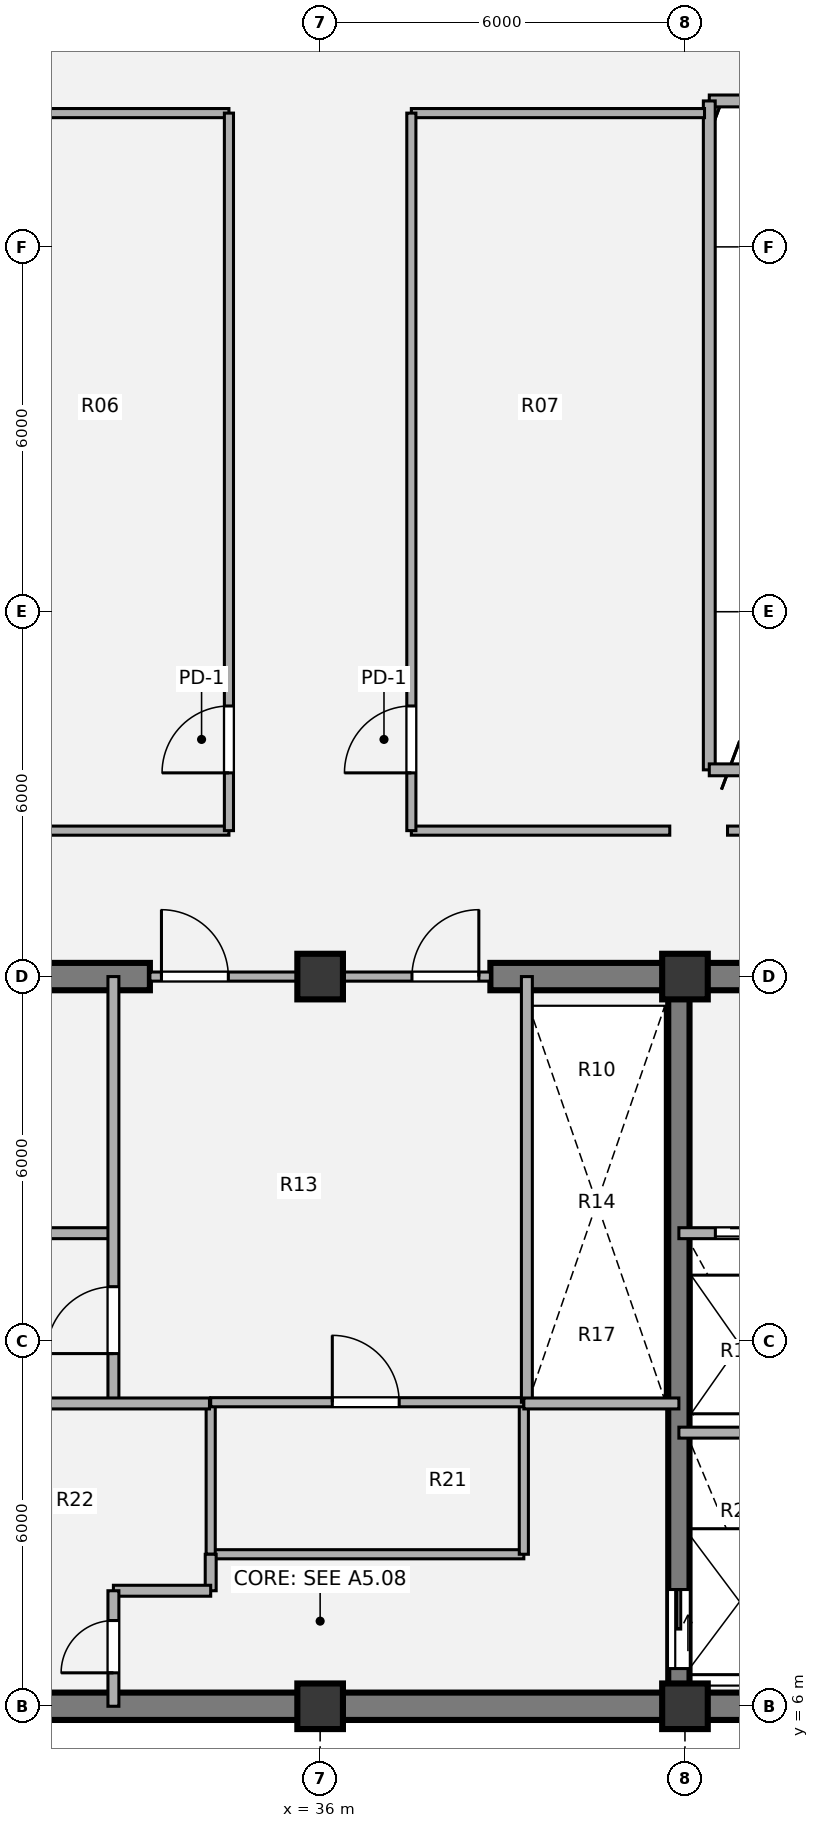
"""IFC4 building model, lengths in metres.
Left out: names, types, materials, properties, quantities, classifications, styles, units other than length and angle.
Written with IfcOpenShell. Run it as: python <this file> out.ifc"""

import sys

from ifc_helpers import new_model, si_unit, direction, frame, frame_2d, origin, origin_2d, place, context, subcontext, project, spatial, rectangle, extrude, source, transform, mapped, element, fill, save


model = new_model("IFC4")
c1 = context("Model", 3, precision=1e-05, world=origin(), true_north=direction((0.0, 1.0)))
c2 = subcontext(c1, "Body", "Model", "MODEL_VIEW")
j1 = project(units=[si_unit("LENGTHUNIT", "METRE"), si_unit("PLANEANGLEUNIT", "RADIAN")], contexts=[c1])
p1 = place(None, origin())
s1 = spatial("IfcSite", under=j1, at=p1, CompositionType="ELEMENT")
p2 = place(p1, origin())
s2 = spatial("IfcBuilding", under=s1, at=p2, CompositionType="ELEMENT")
p3 = place(p2, frame((0.0, 0.0, 213.12)))
s3 = spatial("IfcBuildingStorey", under=s2, at=p3, CompositionType="ELEMENT", Elevation=213.12)
m1 = source(origin(), c2, "Body", "SweptSolid", [
    extrude(rectangle(XDim=0.75, YDim=0.75, at=origin_2d()), origin(), (0.0, 0.0, 1.0), 5.4),
])
for number, where, z_axis, x_axis in (
    (1, (36.0, 6.0, 0.0), (0.0, 0.0, 1.0), (1.0, 0.0, 0.0)),
    (2, (42.0, 6.0, 0.0), (0.0, 0.0, 1.0), (1.0, 0.0, 0.0)),
    (3, (36.0, 18.0, 0.0), (0.0, 0.0, 1.0), (1.0, 0.0, 0.0)),
    (4, (42.0, 18.0, 0.0), (0.0, 0.0, 1.0), (1.0, 0.0, 0.0)),
):
    element("IfcColumn", number, at=place(p3, frame(where, z_axis=z_axis, x_axis=x_axis)), inside=s3, PredefinedType="COLUMN", context=c2, shape_type="MappedRepresentation", body=[
        mapped(m1, transform((0.0, 0.0, 0.0), x_axis=(1.0, 0.0, 0.0), y_axis=(0.0, 1.0, 0.0), z_axis=(0.0, 0.0, 1.0), scale=1.0)),
    ])
p4 = place(p3, frame((48.225, 6.0, 0.0), z_axis=(0.0, 0.0, 1.0), x_axis=(-1.0, 0.0, 0.0)))
e5 = element("IfcWall", 5, at=p4, inside=s3, PredefinedType="SHEAR", context=c2, shape_type="SweptSolid", body=[
    extrude(rectangle(XDim=24.45, YDim=0.45, at=frame_2d((12.225, 0.0))), origin(), (0.0, 0.0, 1.0), 5.4),
])
p5 = place(p3, frame((23.775, 18.0, 0.0), z_axis=(0.0, 0.0, 1.0), x_axis=(1.0, 0.0, 0.0)))
e6 = element("IfcWall", 6, at=p5, inside=s3, PredefinedType="SHEAR", context=c2, shape_type="SweptSolid", body=[
    extrude(rectangle(XDim=9.425, YDim=0.45, at=frame_2d((4.712, 0.0))), origin(), (0.0, 0.0, 1.0), 5.4),
])
p6 = place(p5, frame((1.475, 0.0, 0.0)))
e7 = element("IfcOpeningElement", 7, at=p6, cuts=e6, PredefinedType="OPENING", context=c2, shape_type="SweptSolid", body=[
    extrude(rectangle(XDim=1.1, YDim=2.1, at=origin_2d()), frame((0.55, 0.235, 1.05), z_axis=(0.0, -1.0, 0.0), x_axis=(1.0, 0.0, 0.0)), (0.0, 0.0, 1.0), 0.47),
])
p7 = place(p5, frame((3.475, 0.0, 0.0)))
e8 = element("IfcOpeningElement", 8, at=p7, cuts=e6, PredefinedType="OPENING", context=c2, shape_type="SweptSolid", body=[
    extrude(rectangle(XDim=1.1, YDim=2.1, at=origin_2d()), frame((0.55, 0.235, 1.05), z_axis=(0.0, -1.0, 0.0), x_axis=(1.0, 0.0, 0.0)), (0.0, 0.0, 1.0), 0.47),
])
p8 = place(p3, frame((38.8, 18.0, 0.0), z_axis=(0.0, 0.0, 1.0), x_axis=(1.0, 0.0, 0.0)))
e9 = element("IfcWall", 9, at=p8, inside=s3, PredefinedType="SHEAR", context=c2, shape_type="SweptSolid", body=[
    extrude(rectangle(XDim=9.425, YDim=0.45, at=frame_2d((4.712, 0.0))), origin(), (0.0, 0.0, 1.0), 5.4),
])
p9 = place(p8, frame((4.85, 0.0, 0.0)))
e10 = element("IfcOpeningElement", 10, at=p9, cuts=e9, PredefinedType="OPENING", context=c2, shape_type="SweptSolid", body=[
    extrude(rectangle(XDim=1.1, YDim=2.1, at=origin_2d()), frame((0.55, 0.235, 1.05), z_axis=(0.0, -1.0, 0.0), x_axis=(1.0, 0.0, 0.0)), (0.0, 0.0, 1.0), 0.47),
])
p10 = place(p8, frame((6.85, 0.0, 0.0)))
e11 = element("IfcOpeningElement", 11, at=p10, cuts=e9, PredefinedType="OPENING", context=c2, shape_type="SweptSolid", body=[
    extrude(rectangle(XDim=1.1, YDim=2.1, at=origin_2d()), frame((0.55, 0.235, 1.05), z_axis=(0.0, -1.0, 0.0), x_axis=(1.0, 0.0, 0.0)), (0.0, 0.0, 1.0), 0.47),
])
p11 = place(p3, frame((41.9, 18.0, 0.0), z_axis=(0.0, 0.0, 1.0), x_axis=(0.0, -1.0, 0.0)))
e12 = element("IfcWall", 12, at=p11, inside=s3, PredefinedType="SHEAR", context=c2, shape_type="SweptSolid", body=[
    extrude(rectangle(XDim=12.0, YDim=0.35, at=frame_2d((6.0, 0.0))), origin(), (0.0, 0.0, 1.0), 5.4),
])
p12 = place(p11, frame((10.08, 0.0, 0.0)))
e13 = element("IfcOpeningElement", 13, at=p12, cuts=e12, PredefinedType="OPENING", context=c2, shape_type="SweptSolid", body=[
    extrude(rectangle(XDim=1.3, YDim=2.1, at=origin_2d()), frame((0.65, 0.185, 1.05), z_axis=(0.0, -1.0, 0.0), x_axis=(1.0, 0.0, 0.0)), (0.0, 0.0, 1.0), 0.37),
])
p13 = place(p3, frame((53.0, 32.4, 0.0), z_axis=(0.0, 0.0, 1.0), x_axis=(-1.0, 0.0, 0.0)))
e14 = element("IfcWall", 14, at=p13, inside=s3, PredefinedType="SOLIDWALL", context=c2, shape_type="SweptSolid", body=[
    extrude(rectangle(XDim=10.6, YDim=0.195, at=frame_2d((5.3, 0.0))), origin(), (0.0, 0.0, 1.0), 5.08),
])
p14 = place(p3, frame((42.4, 32.4, 0.0), z_axis=(0.0, 0.0, 1.0), x_axis=(0.0, -1.0, 0.0)))
e15 = element("IfcWall", 15, at=p14, inside=s3, PredefinedType="SOLIDWALL", context=c2, shape_type="SweptSolid", body=[
    extrude(rectangle(XDim=11.0, YDim=0.195, at=frame_2d((5.5, 0.0))), origin(), (0.0, 0.0, 1.0), 5.08),
])
p15 = place(p3, frame((42.4, 21.4, 0.0), z_axis=(0.0, 0.0, 1.0), x_axis=(1.0, 0.0, 0.0)))
e16 = element("IfcWall", 16, at=p15, inside=s3, PredefinedType="SOLIDWALL", context=c2, shape_type="SweptSolid", body=[
    extrude(rectangle(XDim=5.25, YDim=0.195, at=frame_2d((2.625, 0.0))), origin(), (0.0, 0.0, 1.0), 5.08),
])
p16 = place(p3, frame((30.0, 13.78, 0.0), z_axis=(0.0, 0.0, 1.0), x_axis=(1.0, 0.0, 0.0)))
e17 = element("IfcWall", 17, at=p16, inside=s3, PredefinedType="PARTITIONING", context=c2, shape_type="SweptSolid", body=[
    extrude(rectangle(XDim=2.6, YDim=0.18, at=frame_2d((1.3, 0.0))), origin(), (0.0, 0.0, 1.0), 5.05),
])
p17 = place(p3, frame((32.6, 11.0, 0.0), z_axis=(0.0, 0.0, 1.0), x_axis=(0.0, 1.0, 0.0)))
e18 = element("IfcWall", 18, at=p17, inside=s3, PredefinedType="PARTITIONING", context=c2, shape_type="SweptSolid", body=[
    extrude(rectangle(XDim=7.0, YDim=0.18, at=frame_2d((3.5, 0.0))), origin(), (0.0, 0.0, 1.0), 5.05),
])
p18 = place(p17, frame((0.8, 0.0, 0.0)))
e19 = element("IfcOpeningElement", 19, at=p18, cuts=e18, PredefinedType="OPENING", context=c2, shape_type="SweptSolid", body=[
    extrude(rectangle(XDim=1.1, YDim=2.1, at=origin_2d()), frame((0.55, 0.1, 1.05), z_axis=(0.0, -1.0, 0.0), x_axis=(1.0, 0.0, 0.0)), (0.0, 0.0, 1.0), 0.2),
])
p19 = place(p3, frame((34.2, 8.5, 0.0), z_axis=(0.0, 0.0, 1.0), x_axis=(1.0, 0.0, 0.0)))
e20 = element("IfcWall", 20, at=p19, inside=s3, PredefinedType="PARTITIONING", context=c2, shape_type="SweptSolid", body=[
    extrude(rectangle(XDim=5.15, YDim=0.15, at=frame_2d((2.575, 0.0))), origin(), (0.0, 0.0, 1.0), 5.05),
])
for number, where, z_axis, x_axis in (
    (21, (34.2, 8.5, 0.0), (0.0, 0.0, 1.0), (0.0, 1.0, 0.0)),
    (22, (39.35, 8.5, 0.0), (0.0, 0.0, 1.0), (0.0, 1.0, 0.0)),
):
    element("IfcWall", number, at=place(p3, frame(where, z_axis=z_axis, x_axis=x_axis)), inside=s3, PredefinedType="PARTITIONING", context=c2, shape_type="SweptSolid", body=[
        extrude(rectangle(XDim=2.5, YDim=0.15, at=frame_2d((1.25, 0.0))), origin(), (0.0, 0.0, 1.0), 5.05),
    ])
p20 = place(p3, frame((34.2, 11.0, 0.0), z_axis=(0.0, 0.0, 1.0), x_axis=(1.0, 0.0, 0.0)))
e23 = element("IfcWall", 23, at=p20, inside=s3, PredefinedType="PARTITIONING", context=c2, shape_type="SweptSolid", body=[
    extrude(rectangle(XDim=5.15, YDim=0.15, at=frame_2d((2.575, 0.0))), origin(), (0.0, 0.0, 1.0), 5.05),
])
p21 = place(p20, frame((2.0, 0.0, 0.0)))
e24 = element("IfcOpeningElement", 24, at=p21, cuts=e23, PredefinedType="OPENING", context=c2, shape_type="SweptSolid", body=[
    extrude(rectangle(XDim=1.1, YDim=2.1, at=origin_2d()), frame((0.55, 0.085, 1.05), z_axis=(0.0, -1.0, 0.0), x_axis=(1.0, 0.0, 0.0)), (0.0, 0.0, 1.0), 0.17),
])
p22 = place(p3, frame((39.4, 11.0, 0.0), z_axis=(0.0, 0.0, 1.0), x_axis=(0.0, 1.0, 0.0)))
e25 = element("IfcWall", 25, at=p22, inside=s3, PredefinedType="PARTITIONING", context=c2, shape_type="SweptSolid", body=[
    extrude(rectangle(XDim=7.0, YDim=0.18, at=frame_2d((3.5, 0.0))), origin(), (0.0, 0.0, 1.0), 5.05),
])
p23 = place(p3, frame((30.1, 10.98, 0.0), z_axis=(0.0, 0.0, 1.0), x_axis=(1.0, 0.0, 0.0)))
e26 = element("IfcWall", 26, at=p23, inside=s3, PredefinedType="PARTITIONING", context=c2, shape_type="SweptSolid", body=[
    extrude(rectangle(XDim=4.08, YDim=0.18, at=frame_2d((2.04, 0.0))), origin(), (0.0, 0.0, 1.0), 5.05),
])
p24 = place(p3, frame((34.2, 7.9, 0.0), z_axis=(0.0, 0.0, 1.0), x_axis=(0.0, 1.0, 0.0)))
e27 = element("IfcWall", 27, at=p24, inside=s3, PredefinedType="PARTITIONING", context=c2, shape_type="SweptSolid", body=[
    extrude(rectangle(XDim=0.6, YDim=0.18, at=frame_2d((0.3, 0.0))), origin(), (0.0, 0.0, 1.0), 5.05),
])
p25 = place(p3, frame((32.6, 7.9, 0.0), z_axis=(0.0, 0.0, 1.0), x_axis=(1.0, 0.0, 0.0)))
e28 = element("IfcWall", 28, at=p25, inside=s3, PredefinedType="PARTITIONING", context=c2, shape_type="SweptSolid", body=[
    extrude(rectangle(XDim=1.6, YDim=0.18, at=frame_2d((0.8, 0.0))), origin(), (0.0, 0.0, 1.0), 5.05),
])
p26 = place(p3, frame((32.6, 6.0, 0.0), z_axis=(0.0, 0.0, 1.0), x_axis=(0.0, 1.0, 0.0)))
e29 = element("IfcWall", 29, at=p26, inside=s3, PredefinedType="PARTITIONING", context=c2, shape_type="SweptSolid", body=[
    extrude(rectangle(XDim=1.9, YDim=0.18, at=frame_2d((0.95, 0.0))), origin(), (0.0, 0.0, 1.0), 5.05),
])
p27 = place(p26, frame((0.55, 0.0, 0.0)))
e30 = element("IfcOpeningElement", 30, at=p27, cuts=e29, PredefinedType="OPENING", context=c2, shape_type="SweptSolid", body=[
    extrude(rectangle(XDim=0.86, YDim=2.1, at=origin_2d()), frame((0.43, 0.1, 1.05), z_axis=(0.0, -1.0, 0.0), x_axis=(1.0, 0.0, 0.0)), (0.0, 0.0, 1.0), 0.2),
])
p28 = place(p3, frame((39.35, 10.98, 0.0), z_axis=(0.0, 0.0, 1.0), x_axis=(1.0, 0.0, 0.0)))
e31 = element("IfcWall", 31, at=p28, inside=s3, PredefinedType="PARTITIONING", context=c2, shape_type="SweptSolid", body=[
    extrude(rectangle(XDim=2.55, YDim=0.18, at=frame_2d((1.275, 0.0))), origin(), (0.0, 0.0, 1.0), 5.05),
])
p29 = place(p3, frame((33.2, 18.0, 0.0), z_axis=(0.0, 0.0, 1.0), x_axis=(1.0, 0.0, 0.0)))
e32 = element("IfcWall", 32, at=p29, inside=s3, PredefinedType="PARTITIONING", context=c2, shape_type="SweptSolid", body=[
    extrude(rectangle(XDim=5.6, YDim=0.15, at=frame_2d((2.8, 0.0))), origin(), (0.0, 0.0, 1.0), 4.065),
])
p30 = place(p29, frame((0.19, 0.0, 0.0)))
e33 = element("IfcOpeningElement", 33, at=p30, cuts=e32, PredefinedType="OPENING", context=c2, shape_type="SweptSolid", body=[
    extrude(rectangle(XDim=1.1, YDim=2.1, at=origin_2d()), frame((0.55, 0.085, 1.05), z_axis=(0.0, -1.0, 0.0), x_axis=(1.0, 0.0, 0.0)), (0.0, 0.0, 1.0), 0.17),
])
p31 = place(p29, frame((4.31, 0.0, 0.0)))
e34 = element("IfcOpeningElement", 34, at=p31, cuts=e32, PredefinedType="OPENING", context=c2, shape_type="SweptSolid", body=[
    extrude(rectangle(XDim=1.1, YDim=2.1, at=origin_2d()), frame((0.55, 0.085, 1.05), z_axis=(0.0, -1.0, 0.0), x_axis=(1.0, 0.0, 0.0)), (0.0, 0.0, 1.0), 0.17),
])
p32 = place(p3, frame((41.9, 13.78, 0.0), z_axis=(0.0, 0.0, 1.0), x_axis=(1.0, 0.0, 0.0)))
e35 = element("IfcWall", 35, at=p32, inside=s3, PredefinedType="PARTITIONING", context=c2, shape_type="SweptSolid", body=[
    extrude(rectangle(XDim=6.1, YDim=0.18, at=frame_2d((3.05, 0.0))), origin(), (0.0, 0.0, 1.0), 2.229),
])
p33 = place(p32, frame((0.6, 0.0, 0.0)))
e36 = element("IfcOpeningElement", 36, at=p33, cuts=e35, PredefinedType="OPENING", context=c2, shape_type="SweptSolid", body=[
    extrude(rectangle(XDim=1.1, YDim=2.1, at=origin_2d()), frame((0.55, 0.1, 1.05), z_axis=(0.0, -1.0, 0.0), x_axis=(1.0, 0.0, 0.0)), (0.0, 0.0, 1.0), 0.2),
])
p34 = place(p32, frame((3.8, 0.0, 0.0)))
e37 = element("IfcOpeningElement", 37, at=p34, cuts=e35, PredefinedType="OPENING", context=c2, shape_type="SweptSolid", body=[
    extrude(rectangle(XDim=1.1, YDim=2.1, at=origin_2d()), frame((0.55, 0.1, 1.05), z_axis=(0.0, -1.0, 0.0), x_axis=(1.0, 0.0, 0.0)), (0.0, 0.0, 1.0), 0.2),
])
p35 = place(p3, frame((41.9, 10.5, 0.0), z_axis=(0.0, 0.0, 1.0), x_axis=(1.0, 0.0, 0.0)))
e38 = element("IfcWall", 38, at=p35, inside=s3, PredefinedType="PARTITIONING", context=c2, shape_type="SweptSolid", body=[
    extrude(rectangle(XDim=1.95, YDim=0.18, at=frame_2d((0.975, 0.0))), origin(), (0.0, 0.0, 1.0), 5.05),
])
for number, where, z_axis, x_axis in (
    (39, (30.25, 20.4, 0.0), (0.0, 0.0, 1.0), (1.0, 0.0, 0.0)),
    (40, (37.5, 20.4, 0.0), (0.0, 0.0, 1.0), (1.0, 0.0, 0.0)),
):
    element("IfcWall", number, at=place(p3, frame(where, z_axis=z_axis, x_axis=x_axis)), inside=s3, PredefinedType="PARTITIONING", context=c2, shape_type="SweptSolid", body=[
        extrude(rectangle(XDim=4.25, YDim=0.15, at=frame_2d((2.125, 0.0))), origin(), (0.0, 0.0, 1.0), 5.05),
    ])
p36 = place(p3, frame((42.7, 20.4, 0.0), z_axis=(0.0, 0.0, 1.0), x_axis=(1.0, 0.0, 0.0)))
e41 = element("IfcWall", 41, at=p36, inside=s3, PredefinedType="PARTITIONING", context=c2, shape_type="SweptSolid", body=[
    extrude(rectangle(XDim=5.22, YDim=0.15, at=frame_2d((2.61, 0.0))), origin(), (0.0, 0.0, 1.0), 5.05),
])
for number, where, z_axis, x_axis in (
    (42, (29.678, 32.2, 0.0), (0.0, 0.0, 1.0), (1.0, 0.0, 0.0)),
    (43, (37.5, 32.2, 0.0), (0.0, 0.0, 1.0), (1.0, 0.0, 0.0)),
):
    element("IfcWall", number, at=place(p3, frame(where, z_axis=z_axis, x_axis=x_axis)), inside=s3, PredefinedType="PARTITIONING", context=c2, shape_type="SweptSolid", body=[
        extrude(rectangle(XDim=4.822, YDim=0.15, at=frame_2d((2.411, 0.0))), origin(), (0.0, 0.0, 1.0), 5.05),
    ])
p37 = place(p3, frame((34.5, 20.4, 0.0), z_axis=(0.0, 0.0, 1.0), x_axis=(0.0, 1.0, 0.0)))
e44 = element("IfcWall", 44, at=p37, inside=s3, PredefinedType="PARTITIONING", context=c2, shape_type="SweptSolid", body=[
    extrude(rectangle(XDim=11.8, YDim=0.15, at=frame_2d((5.9, 0.0))), origin(), (0.0, 0.0, 1.0), 5.05),
])
p38 = place(p37, frame((0.95, 0.0, 0.0)))
e45 = element("IfcOpeningElement", 45, at=p38, cuts=e44, PredefinedType="OPENING", context=c2, shape_type="SweptSolid", body=[
    extrude(rectangle(XDim=1.1, YDim=2.1, at=origin_2d()), frame((0.55, 0.085, 1.05), z_axis=(0.0, -1.0, 0.0), x_axis=(1.0, 0.0, 0.0)), (0.0, 0.0, 1.0), 0.17),
])
p39 = place(p3, frame((37.5, 20.4, 0.0), z_axis=(0.0, 0.0, 1.0), x_axis=(0.0, 1.0, 0.0)))
e46 = element("IfcWall", 46, at=p39, inside=s3, PredefinedType="PARTITIONING", context=c2, shape_type="SweptSolid", body=[
    extrude(rectangle(XDim=11.8, YDim=0.15, at=frame_2d((5.9, 0.0))), origin(), (0.0, 0.0, 1.0), 5.05),
])
p40 = place(p39, frame((0.95, 0.0, 0.0)))
e47 = element("IfcOpeningElement", 47, at=p40, cuts=e46, PredefinedType="OPENING", context=c2, shape_type="SweptSolid", body=[
    extrude(rectangle(XDim=1.1, YDim=2.1, at=origin_2d()), frame((0.55, 0.085, 1.05), z_axis=(0.0, -1.0, 0.0), x_axis=(1.0, 0.0, 0.0)), (0.0, 0.0, 1.0), 0.17),
])
m2 = source(origin(), c2, "Body", "SweptSolid", [
    extrude(rectangle(XDim=1.1, YDim=2.1, at=origin_2d()), frame((0.55, 0.025, 1.05), z_axis=(0.0, -1.0, 0.0), x_axis=(1.0, 0.0, 0.0)), (0.0, 0.0, 1.0), 0.05),
])
p41 = place(p18, origin())
e48 = element("IfcDoor", 48, at=p41, inside=s3, OperationType="SINGLE_SWING_LEFT", PredefinedType="DOOR", context=c2, shape_type="MappedRepresentation", body=[
    mapped(m2, transform((0.0, 0.0, 0.0), x_axis=(1.0, 0.0, 0.0), y_axis=(0.0, 1.0, 0.0), z_axis=(0.0, 0.0, 1.0), scale=1.0)),
])
fill(e19, e48)
p42 = place(p21, origin())
e49 = element("IfcDoor", 49, at=p42, inside=s3, OperationType="SINGLE_SWING_LEFT", PredefinedType="DOOR", context=c2, shape_type="MappedRepresentation", body=[
    mapped(m2, transform((0.0, 0.0, 0.0), x_axis=(1.0, 0.0, 0.0), y_axis=(0.0, 1.0, 0.0), z_axis=(0.0, 0.0, 1.0), scale=1.0)),
])
fill(e24, e49)
m3 = source(origin(), c2, "Body", "SweptSolid", [
    extrude(rectangle(XDim=0.86, YDim=2.1, at=origin_2d()), frame((0.43, 0.025, 1.05), z_axis=(0.0, -1.0, 0.0), x_axis=(1.0, 0.0, 0.0)), (0.0, 0.0, 1.0), 0.05),
])
p43 = place(p27, origin())
e50 = element("IfcDoor", 50, at=p43, inside=s3, OperationType="SINGLE_SWING_LEFT", PredefinedType="DOOR", context=c2, shape_type="MappedRepresentation", body=[
    mapped(m3, transform((0.0, 0.0, 0.0), x_axis=(1.0, 0.0, 0.0), y_axis=(0.0, 1.0, 0.0), z_axis=(0.0, 0.0, 1.0), scale=1.0)),
])
fill(e30, e50)
m4 = source(origin(), c2, "Body", "SweptSolid", [
    extrude(rectangle(XDim=1.1, YDim=2.1, at=origin_2d()), frame((0.55, 0.025, 1.05), z_axis=(0.0, -1.0, 0.0), x_axis=(1.0, 0.0, 0.0)), (0.0, 0.0, 1.0), 0.05),
])
p44 = place(p30, origin())
e51 = element("IfcDoor", 51, at=p44, inside=s3, OperationType="SINGLE_SWING_LEFT", PredefinedType="DOOR", context=c2, shape_type="MappedRepresentation", body=[
    mapped(m4, transform((0.0, 0.0, 0.0), x_axis=(1.0, 0.0, 0.0), y_axis=(0.0, 1.0, 0.0), z_axis=(0.0, 0.0, 1.0), scale=1.0)),
])
fill(e33, e51)
p45 = place(p31, origin())
e52 = element("IfcDoor", 52, at=p45, inside=s3, OperationType="SINGLE_SWING_RIGHT", PredefinedType="DOOR", context=c2, shape_type="MappedRepresentation", body=[
    mapped(m4, transform((0.0, 0.0, 0.0), x_axis=(1.0, 0.0, 0.0), y_axis=(0.0, 1.0, 0.0), z_axis=(0.0, 0.0, 1.0), scale=1.0)),
])
fill(e34, e52)
m5 = source(origin(), c2, "Body", "SweptSolid", [
    extrude(rectangle(XDim=1.1, YDim=2.1, at=origin_2d()), frame((0.55, 0.025, 1.05), z_axis=(0.0, -1.0, 0.0), x_axis=(1.0, 0.0, 0.0)), (0.0, 0.0, 1.0), 0.05),
])
p46 = place(p33, origin())
e53 = element("IfcDoor", 53, at=p46, inside=s3, OperationType="SLIDING_TO_RIGHT", PredefinedType="DOOR", context=c2, shape_type="MappedRepresentation", body=[
    mapped(m5, transform((0.0, 0.0, 0.0), x_axis=(1.0, 0.0, 0.0), y_axis=(0.0, 1.0, 0.0), z_axis=(0.0, 0.0, 1.0), scale=1.0)),
])
fill(e36, e53)
m6 = source(origin(), c2, "Body", "SweptSolid", [
    extrude(rectangle(XDim=1.3, YDim=2.1, at=origin_2d()), frame((0.65, 0.025, 1.05), z_axis=(0.0, -1.0, 0.0), x_axis=(1.0, 0.0, 0.0)), (0.0, 0.0, 1.0), 0.05),
])
p47 = place(p12, origin())
e54 = element("IfcDoor", 54, at=p47, inside=s3, OperationType="SLIDING_TO_LEFT", PredefinedType="DOOR", context=c2, shape_type="MappedRepresentation", body=[
    mapped(m6, transform((0.0, 0.0, 0.0), x_axis=(1.0, 0.0, 0.0), y_axis=(0.0, 1.0, 0.0), z_axis=(0.0, 0.0, 1.0), scale=1.0)),
])
fill(e13, e54)
p48 = place(p38, origin())
e55 = element("IfcDoor", 55, at=p48, inside=s3, OperationType="SINGLE_SWING_LEFT", PredefinedType="DOOR", context=c2, shape_type="MappedRepresentation", body=[
    mapped(m2, transform((0.0, 0.0, 0.0), x_axis=(1.0, 0.0, 0.0), y_axis=(0.0, 1.0, 0.0), z_axis=(0.0, 0.0, 1.0), scale=1.0)),
])
fill(e45, e55)
p49 = place(p40, origin())
e56 = element("IfcDoor", 56, at=p49, inside=s3, OperationType="SINGLE_SWING_LEFT", PredefinedType="DOOR", context=c2, shape_type="MappedRepresentation", body=[
    mapped(m2, transform((0.0, 0.0, 0.0), x_axis=(1.0, 0.0, 0.0), y_axis=(0.0, 1.0, 0.0), z_axis=(0.0, 0.0, 1.0), scale=1.0)),
])
fill(e47, e56)
save(model, sys.argv[1])
